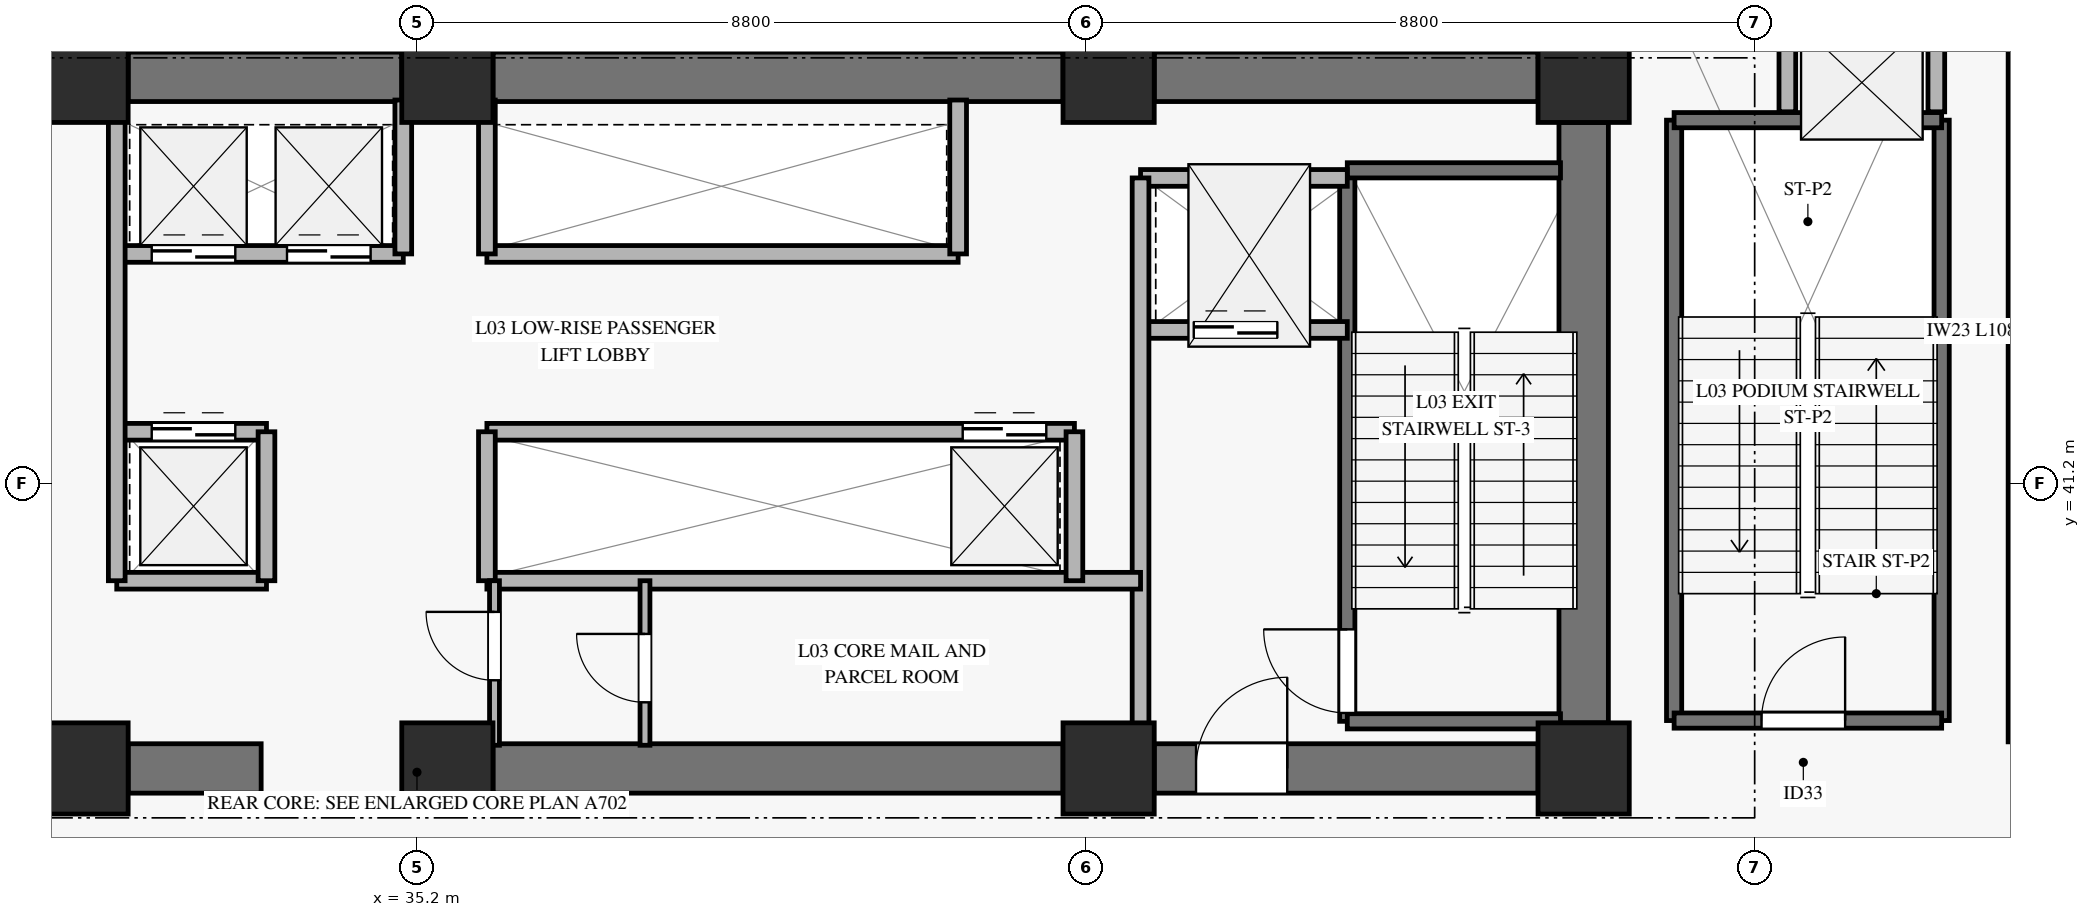
"""IFC4 building model, lengths in metres.
Left out: names, types, materials, properties, quantities, classifications, styles, units other than length and angle.
Written with IfcOpenShell. Run it as: python <this file> out.ifc"""

import sys

from ifc_helpers import new_model, si_unit, direction, frame, frame_2d, origin, origin_2d, place, context, subcontext, project, spatial, rectangle, extrude, source, transform, mapped, element, fill, save


model = new_model("IFC4")
c1 = context("Model", 3, precision=1e-05, world=origin(), true_north=direction((0.0, 1.0)))
c2 = subcontext(c1, "Body", "Model", "MODEL_VIEW")
j1 = project(units=[si_unit("LENGTHUNIT", "METRE"), si_unit("PLANEANGLEUNIT", "RADIAN")], contexts=[c1])
p1 = place(None, origin())
s1 = spatial("IfcSite", under=j1, at=p1, CompositionType="ELEMENT")
p2 = place(p1, origin())
s2 = spatial("IfcBuilding", under=s1, at=p2, CompositionType="ELEMENT")
p3 = place(p2, frame((0.0, 0.0, 10.4)))
s3 = spatial("IfcBuildingStorey", under=s2, at=p3, CompositionType="ELEMENT", Elevation=10.4)
m1 = source(origin(), c2, "Body", "SweptSolid", [
    extrude(rectangle(XDim=1.2, YDim=1.2, at=origin_2d()), origin(), (0.0, 0.0, 1.0), 4.54),
])
for number, where, z_axis, x_axis in (
    (1, (30.8, 37.45, 0.0), (0.0, 0.0, 1.0), (1.0, 0.0, 0.0)),
    (2, (30.8, 46.55, 0.0), (0.0, 0.0, 1.0), (1.0, 0.0, 0.0)),
    (3, (35.6, 37.45, 0.0), (0.0, 0.0, 1.0), (1.0, 0.0, 0.0)),
    (4, (35.6, 46.55, 0.0), (0.0, 0.0, 1.0), (1.0, 0.0, 0.0)),
    (5, (44.3, 37.45, 0.0), (0.0, 0.0, 1.0), (1.0, 0.0, 0.0)),
    (6, (44.3, 46.55, 0.0), (0.0, 0.0, 1.0), (1.0, 0.0, 0.0)),
    (7, (50.55, 37.45, 0.0), (0.0, 0.0, 1.0), (1.0, 0.0, 0.0)),
    (8, (50.55, 46.55, 0.0), (0.0, 0.0, 1.0), (1.0, 0.0, 0.0)),
):
    element("IfcColumn", number, at=place(p3, frame(where, z_axis=z_axis, x_axis=x_axis)), inside=s3, PredefinedType="PILASTER", context=c2, shape_type="MappedRepresentation", body=[
        mapped(m1, transform((0.0, 0.0, 0.0), x_axis=(1.0, 0.0, 0.0), y_axis=(0.0, 1.0, 0.0), z_axis=(0.0, 0.0, 1.0), scale=1.0)),
    ])
p4 = place(p3, frame((31.4, 46.55, 0.0), z_axis=(0.0, 0.0, 1.0), x_axis=(1.0, 0.0, 0.0)))
e9 = element("IfcWall", 9, at=p4, inside=s3, PredefinedType="SHEAR", context=c2, shape_type="SweptSolid", body=[
    extrude(rectangle(XDim=3.6, YDim=0.65, at=frame_2d((1.8, 0.0))), origin(), (0.0, 0.0, 1.0), 4.54),
])
p5 = place(p3, frame((36.2, 46.55, 0.0), z_axis=(0.0, 0.0, 1.0), x_axis=(1.0, 0.0, 0.0)))
e10 = element("IfcWall", 10, at=p5, inside=s3, PredefinedType="SHEAR", context=c2, shape_type="SweptSolid", body=[
    extrude(rectangle(XDim=7.5, YDim=0.65, at=frame_2d((3.75, 0.0))), origin(), (0.0, 0.0, 1.0), 4.54),
])
p6 = place(p3, frame((44.9, 46.55, 0.0), z_axis=(0.0, 0.0, 1.0), x_axis=(1.0, 0.0, 0.0)))
e11 = element("IfcWall", 11, at=p6, inside=s3, PredefinedType="SHEAR", context=c2, shape_type="SweptSolid", body=[
    extrude(rectangle(XDim=5.05, YDim=0.65, at=frame_2d((2.525, 0.0))), origin(), (0.0, 0.0, 1.0), 4.54),
])
p7 = place(p3, frame((31.4, 37.45, 0.0), z_axis=(0.0, 0.0, 1.0), x_axis=(1.0, 0.0, 0.0)))
e12 = element("IfcWall", 12, at=p7, inside=s3, PredefinedType="SHEAR", context=c2, shape_type="SweptSolid", body=[
    extrude(rectangle(XDim=1.75, YDim=0.65, at=frame_2d((0.875, 0.0))), origin(), (0.0, 0.0, 1.0), 4.54),
])
p8 = place(p3, frame((36.2, 37.45, 0.0), z_axis=(0.0, 0.0, 1.0), x_axis=(1.0, 0.0, 0.0)))
e13 = element("IfcWall", 13, at=p8, inside=s3, PredefinedType="SHEAR", context=c2, shape_type="SweptSolid", body=[
    extrude(rectangle(XDim=7.5, YDim=0.65, at=frame_2d((3.75, 0.0))), origin(), (0.0, 0.0, 1.0), 4.54),
])
p9 = place(p3, frame((44.9, 37.45, 0.0), z_axis=(0.0, 0.0, 1.0), x_axis=(1.0, 0.0, 0.0)))
e14 = element("IfcWall", 14, at=p9, inside=s3, PredefinedType="SHEAR", context=c2, shape_type="SweptSolid", body=[
    extrude(rectangle(XDim=5.05, YDim=0.65, at=frame_2d((2.525, 0.0))), origin(), (0.0, 0.0, 1.0), 4.54),
])
p10 = place(p9, frame((0.55, 0.0, 0.0)))
e15 = element("IfcOpeningElement", 15, at=p10, cuts=e14, PredefinedType="OPENING", context=c2, shape_type="SweptSolid", body=[
    extrude(rectangle(XDim=1.2, YDim=2.15, at=frame_2d((0.6, 1.075))), frame((0.0, 0.335, 0.0), z_axis=(0.0, -1.0, 0.0), x_axis=(1.0, 0.0, 0.0)), (0.0, 0.0, 1.0), 0.67),
])
p11 = place(p3, frame((50.55, 38.05, 0.0), z_axis=(0.0, 0.0, 1.0), x_axis=(0.0, 1.0, 0.0)))
e16 = element("IfcWall", 16, at=p11, inside=s3, PredefinedType="SHEAR", context=c2, shape_type="SweptSolid", body=[
    extrude(rectangle(XDim=7.9, YDim=0.65, at=frame_2d((3.95, 0.0))), origin(), (0.0, 0.0, 1.0), 4.54),
])
p12 = place(p3, frame((47.44, 38.07, 0.0), z_axis=(0.0, 0.0, 1.0), x_axis=(0.0, 1.0, 0.0)))
e17 = element("IfcWall", 17, at=p12, inside=s3, PredefinedType="SOLIDWALL", context=c2, shape_type="SweptSolid", body=[
    extrude(rectangle(XDim=7.25, YDim=0.2, at=frame_2d((3.625, 0.0))), origin(), (0.0, 0.0, 1.0), 4.8),
])
p13 = place(p12, frame((0.11, 0.0, 0.0)))
e18 = element("IfcOpeningElement", 18, at=p13, cuts=e17, PredefinedType="OPENING", context=c2, shape_type="SweptSolid", body=[
    extrude(rectangle(XDim=1.1, YDim=2.15, at=frame_2d((0.55, 1.075))), frame((0.0, 0.11, 0.0), z_axis=(0.0, -1.0, 0.0), x_axis=(1.0, 0.0, 0.0)), (0.0, 0.0, 1.0), 0.22),
])
for number, where, z_axis, x_axis in (
    (19, (47.44, 45.32, 0.0), (0.0, 0.0, 1.0), (1.0, 0.0, 0.0)),
    (20, (47.44, 38.07, 0.0), (0.0, 0.0, 1.0), (1.0, 0.0, 0.0)),
):
    element("IfcWall", number, at=place(p3, frame(where, z_axis=z_axis, x_axis=x_axis)), inside=s3, PredefinedType="SOLIDWALL", context=c2, shape_type="SweptSolid", body=[
        extrude(rectangle(XDim=2.805, YDim=0.2, at=frame_2d((1.403, 0.0))), origin(), (0.0, 0.0, 1.0), 4.8),
    ])
p14 = place(p3, frame((44.72, 43.22, 0.0), z_axis=(0.0, 0.0, 1.0), x_axis=(1.0, 0.0, 0.0)))
e21 = element("IfcWall", 21, at=p14, inside=s3, PredefinedType="SOLIDWALL", context=c2, shape_type="SweptSolid", body=[
    extrude(rectangle(XDim=2.72, YDim=0.22, at=frame_2d((1.36, 0.0))), origin(), (0.0, 0.0, 1.0), 4.54),
])
p15 = place(p14, frame((0.7, 0.0, 0.0)))
e22 = element("IfcOpeningElement", 22, at=p15, cuts=e21, PredefinedType="OPENING", context=c2, shape_type="SweptSolid", body=[
    extrude(rectangle(XDim=1.1, YDim=2.2, at=frame_2d((0.55, 1.1))), frame((0.0, 0.12, 0.0), z_axis=(0.0, -1.0, 0.0), x_axis=(1.0, 0.0, 0.0)), (0.0, 0.0, 1.0), 0.24),
])
p16 = place(p3, frame((44.72, 45.22, 0.0), z_axis=(0.0, 0.0, 1.0), x_axis=(1.0, 0.0, 0.0)))
e23 = element("IfcWall", 23, at=p16, inside=s3, PredefinedType="SOLIDWALL", context=c2, shape_type="SweptSolid", body=[
    extrude(rectangle(XDim=2.72, YDim=0.22, at=frame_2d((1.36, 0.0))), origin(), (0.0, 0.0, 1.0), 4.54),
])
p17 = place(p3, frame((44.72, 37.755, 0.0), z_axis=(0.0, 0.0, 1.0), x_axis=(0.0, 1.0, 0.0)))
e24 = element("IfcWall", 24, at=p17, inside=s3, PredefinedType="SOLIDWALL", context=c2, shape_type="SweptSolid", body=[
    extrude(rectangle(XDim=7.465, YDim=0.22, at=frame_2d((3.732, 0.0))), origin(), (0.0, 0.0, 1.0), 4.54),
])
for number, where, z_axis, x_axis in (
    (25, (51.74, 38.08, 0.0), (0.0, 0.0, 1.0), (0.0, 1.0, 0.0)),
    (26, (55.26, 38.08, 0.0), (0.0, 0.0, 1.0), (0.0, 1.0, 0.0)),
):
    element("IfcWall", number, at=place(p3, frame(where, z_axis=z_axis, x_axis=x_axis)), inside=s3, PredefinedType="SOLIDWALL", context=c2, shape_type="SweptSolid", body=[
        extrude(rectangle(XDim=7.9, YDim=0.2, at=frame_2d((3.95, 0.0))), origin(), (0.0, 0.0, 1.0), 4.8),
    ])
p18 = place(p3, frame((51.74, 45.98, 0.0), z_axis=(0.0, 0.0, 1.0), x_axis=(1.0, 0.0, 0.0)))
e27 = element("IfcWall", 27, at=p18, inside=s3, PredefinedType="SOLIDWALL", context=c2, shape_type="SweptSolid", body=[
    extrude(rectangle(XDim=3.52, YDim=0.2, at=frame_2d((1.76, 0.0))), origin(), (0.0, 0.0, 1.0), 4.8),
])
p19 = place(p3, frame((51.74, 38.08, 0.0), z_axis=(0.0, 0.0, 1.0), x_axis=(1.0, 0.0, 0.0)))
e28 = element("IfcWall", 28, at=p19, inside=s3, PredefinedType="SOLIDWALL", context=c2, shape_type="SweptSolid", body=[
    extrude(rectangle(XDim=3.52, YDim=0.2, at=frame_2d((1.76, 0.0))), origin(), (0.0, 0.0, 1.0), 4.8),
])
p20 = place(p19, frame((1.15, 0.0, 0.0)))
e29 = element("IfcOpeningElement", 29, at=p20, cuts=e28, PredefinedType="OPENING", context=c2, shape_type="SweptSolid", body=[
    extrude(rectangle(XDim=1.1, YDim=2.15, at=frame_2d((0.55, 1.075))), frame((0.0, 0.11, 0.0), z_axis=(0.0, -1.0, 0.0), x_axis=(1.0, 0.0, 0.0)), (0.0, 0.0, 1.0), 0.22),
])
for number, where, z_axis, x_axis in (
    (30, (53.23, 46.09, 0.0), (0.0, 0.0, 1.0), (0.0, 1.0, 0.0)),
    (31, (55.19, 46.09, 0.0), (0.0, 0.0, 1.0), (0.0, 1.0, 0.0)),
):
    element("IfcWall", number, at=place(p3, frame(where, z_axis=z_axis, x_axis=x_axis)), inside=s3, PredefinedType="SOLIDWALL", context=c2, shape_type="SweptSolid", body=[
        extrude(rectangle(XDim=1.29, YDim=0.22, at=frame_2d((0.645, 0.0))), origin(), (0.0, 0.0, 1.0), 4.54),
    ])
p21 = place(p3, frame((31.25, 44.22, 0.0), z_axis=(0.0, 0.0, 1.0), x_axis=(1.0, 0.0, 0.0)))
e32 = element("IfcWall", 32, at=p21, inside=s3, PredefinedType="SOLIDWALL", context=c2, shape_type="SweptSolid", body=[
    extrude(rectangle(XDim=3.77, YDim=0.22, at=frame_2d((1.885, 0.0))), origin(), (0.0, 0.0, 1.0), 4.54),
])
p22 = place(p21, frame((0.46, 0.0, 0.0)))
e33 = element("IfcOpeningElement", 33, at=p22, cuts=e32, PredefinedType="OPENING", context=c2, shape_type="SweptSolid", body=[
    extrude(rectangle(XDim=1.1, YDim=2.2, at=frame_2d((0.55, 1.1))), frame((0.0, 0.12, 0.0), z_axis=(0.0, -1.0, 0.0), x_axis=(1.0, 0.0, 0.0)), (0.0, 0.0, 1.0), 0.24),
])
p23 = place(p21, frame((2.24, 0.0, 0.0)))
e34 = element("IfcOpeningElement", 34, at=p23, cuts=e32, PredefinedType="OPENING", context=c2, shape_type="SweptSolid", body=[
    extrude(rectangle(XDim=1.1, YDim=2.2, at=frame_2d((0.55, 1.1))), frame((0.0, 0.12, 0.0), z_axis=(0.0, -1.0, 0.0), x_axis=(1.0, 0.0, 0.0)), (0.0, 0.0, 1.0), 0.24),
])
p24 = place(p3, frame((36.12, 44.22, 0.0), z_axis=(0.0, 0.0, 1.0), x_axis=(1.0, 0.0, 0.0)))
e35 = element("IfcWall", 35, at=p24, inside=s3, PredefinedType="SOLIDWALL", context=c2, shape_type="SweptSolid", body=[
    extrude(rectangle(XDim=6.2, YDim=0.22, at=frame_2d((3.1, 0.0))), origin(), (0.0, 0.0, 1.0), 4.54),
])
for number, where, z_axis, x_axis in (
    (36, (35.02, 44.22, 0.0), (0.0, 0.0, 1.0), (0.0, 1.0, 0.0)),
    (37, (36.12, 44.22, 0.0), (0.0, 0.0, 1.0), (0.0, 1.0, 0.0)),
    (38, (42.32, 44.22, 0.0), (0.0, 0.0, 1.0), (0.0, 1.0, 0.0)),
):
    element("IfcWall", number, at=place(p3, frame(where, z_axis=z_axis, x_axis=x_axis)), inside=s3, PredefinedType="SOLIDWALL", context=c2, shape_type="SweptSolid", body=[
        extrude(rectangle(XDim=2.025, YDim=0.22, at=frame_2d((1.013, 0.0))), origin(), (0.0, 0.0, 1.0), 4.54),
    ])
p25 = place(p3, frame((31.25, 41.88, 0.0), z_axis=(0.0, 0.0, 1.0), x_axis=(1.0, 0.0, 0.0)))
e39 = element("IfcWall", 39, at=p25, inside=s3, PredefinedType="SOLIDWALL", context=c2, shape_type="SweptSolid", body=[
    extrude(rectangle(XDim=1.97, YDim=0.22, at=frame_2d((0.985, 0.0))), origin(), (0.0, 0.0, 1.0), 4.54),
])
p26 = place(p25, frame((0.46, 0.0, 0.0)))
e40 = element("IfcOpeningElement", 40, at=p26, cuts=e39, PredefinedType="OPENING", context=c2, shape_type="SweptSolid", body=[
    extrude(rectangle(XDim=1.1, YDim=2.2, at=frame_2d((0.55, 1.1))), frame((0.0, 0.12, 0.0), z_axis=(0.0, -1.0, 0.0), x_axis=(1.0, 0.0, 0.0)), (0.0, 0.0, 1.0), 0.24),
])
p27 = place(p3, frame((36.12, 41.88, 0.0), z_axis=(0.0, 0.0, 1.0), x_axis=(1.0, 0.0, 0.0)))
e41 = element("IfcWall", 41, at=p27, inside=s3, PredefinedType="SOLIDWALL", context=c2, shape_type="SweptSolid", body=[
    extrude(rectangle(XDim=7.73, YDim=0.22, at=frame_2d((3.865, 0.0))), origin(), (0.0, 0.0, 1.0), 4.54),
])
p28 = place(p27, frame((6.26, 0.0, 0.0)))
e42 = element("IfcOpeningElement", 42, at=p28, cuts=e41, PredefinedType="OPENING", context=c2, shape_type="SweptSolid", body=[
    extrude(rectangle(XDim=1.1, YDim=2.2, at=frame_2d((0.55, 1.1))), frame((0.0, 0.12, 0.0), z_axis=(0.0, -1.0, 0.0), x_axis=(1.0, 0.0, 0.0)), (0.0, 0.0, 1.0), 0.24),
])
p29 = place(p3, frame((31.25, 39.92, 0.0), z_axis=(0.0, 0.0, 1.0), x_axis=(1.0, 0.0, 0.0)))
e43 = element("IfcWall", 43, at=p29, inside=s3, PredefinedType="SOLIDWALL", context=c2, shape_type="SweptSolid", body=[
    extrude(rectangle(XDim=1.97, YDim=0.22, at=frame_2d((0.985, 0.0))), origin(), (0.0, 0.0, 1.0), 4.54),
])
p30 = place(p3, frame((33.22, 39.92, 0.0), z_axis=(0.0, 0.0, 1.0), x_axis=(0.0, 1.0, 0.0)))
e44 = element("IfcWall", 44, at=p30, inside=s3, PredefinedType="SOLIDWALL", context=c2, shape_type="SweptSolid", body=[
    extrude(rectangle(XDim=1.96, YDim=0.22, at=frame_2d((0.98, 0.0))), origin(), (0.0, 0.0, 1.0), 4.54),
])
p31 = place(p3, frame((36.12, 39.92, 0.0), z_axis=(0.0, 0.0, 1.0), x_axis=(1.0, 0.0, 0.0)))
e45 = element("IfcWall", 45, at=p31, inside=s3, PredefinedType="SOLIDWALL", context=c2, shape_type="SweptSolid", body=[
    extrude(rectangle(XDim=8.6, YDim=0.22, at=frame_2d((4.3, 0.0))), origin(), (0.0, 0.0, 1.0), 3.825),
])
p32 = place(p3, frame((36.12, 39.92, 0.0), z_axis=(0.0, 0.0, 1.0), x_axis=(0.0, 1.0, 0.0)))
e46 = element("IfcWall", 46, at=p32, inside=s3, PredefinedType="SOLIDWALL", context=c2, shape_type="SweptSolid", body=[
    extrude(rectangle(XDim=1.96, YDim=0.22, at=frame_2d((0.98, 0.0))), origin(), (0.0, 0.0, 1.0), 4.54),
])
p33 = place(p3, frame((31.25, 39.92, 0.0), z_axis=(0.0, 0.0, 1.0), x_axis=(0.0, 1.0, 0.0)))
e47 = element("IfcWall", 47, at=p33, inside=s3, PredefinedType="SOLIDWALL", context=c2, shape_type="SweptSolid", body=[
    extrude(rectangle(XDim=6.325, YDim=0.22, at=frame_2d((3.163, 0.0))), origin(), (0.0, 0.0, 1.0), 4.54),
])
p34 = place(p3, frame((43.85, 39.92, 0.0), z_axis=(0.0, 0.0, 1.0), x_axis=(0.0, 1.0, 0.0)))
e48 = element("IfcWall", 48, at=p34, inside=s3, PredefinedType="SOLIDWALL", context=c2, shape_type="SweptSolid", body=[
    extrude(rectangle(XDim=1.96, YDim=0.22, at=frame_2d((0.98, 0.0))), origin(), (0.0, 0.0, 1.0), 4.54),
])
p35 = place(p3, frame((36.22, 37.755, 0.0), z_axis=(0.0, 0.0, 1.0), x_axis=(0.0, 1.0, 0.0)))
e49 = element("IfcWall", 49, at=p35, inside=s3, PredefinedType="PARTITIONING", context=c2, shape_type="SweptSolid", body=[
    extrude(rectangle(XDim=2.165, YDim=0.13, at=frame_2d((1.083, 0.0))), origin(), (0.0, 0.0, 1.0), 4.54),
])
p36 = place(p35, frame((0.855, 0.0, 0.0)))
e50 = element("IfcOpeningElement", 50, at=p36, cuts=e49, PredefinedType="OPENING", context=c2, shape_type="SweptSolid", body=[
    extrude(rectangle(XDim=0.9, YDim=2.1, at=frame_2d((0.45, 1.05))), frame((0.0, 0.075, 0.0), z_axis=(0.0, -1.0, 0.0), x_axis=(1.0, 0.0, 0.0)), (0.0, 0.0, 1.0), 0.15),
])
p37 = place(p3, frame((38.2, 37.755, 0.0), z_axis=(0.0, 0.0, 1.0), x_axis=(0.0, 1.0, 0.0)))
e51 = element("IfcWall", 51, at=p37, inside=s3, PredefinedType="PARTITIONING", context=c2, shape_type="SweptSolid", body=[
    extrude(rectangle(XDim=2.165, YDim=0.13, at=frame_2d((1.083, 0.0))), origin(), (0.0, 0.0, 1.0), 4.54),
])
p38 = place(p37, frame((0.565, 0.0, 0.0)))
e52 = element("IfcOpeningElement", 52, at=p38, cuts=e51, PredefinedType="OPENING", context=c2, shape_type="SweptSolid", body=[
    extrude(rectangle(XDim=0.9, YDim=2.1, at=frame_2d((0.45, 1.05))), frame((0.0, 0.075, 0.0), z_axis=(0.0, -1.0, 0.0), x_axis=(1.0, 0.0, 0.0)), (0.0, 0.0, 1.0), 0.15),
])
p39 = place(p3, frame((56.2, 37.8, 0.0), z_axis=(0.0, 0.0, 1.0), x_axis=(0.0, 1.0, 0.0)))
e53 = element("IfcWall", 53, at=p39, inside=s3, PredefinedType="PARTITIONING", context=c2, shape_type="SweptSolid", body=[
    extrude(rectangle(XDim=10.82, YDim=0.13, at=frame_2d((5.41, 0.0))), origin(), (0.0, 0.0, 1.0), 4.54),
])
m2 = source(origin(), c2, "Body", "SweptSolid", [
    extrude(rectangle(XDim=1.1, YDim=2.15, at=frame_2d((0.55, 1.075))), frame((0.0, 0.025, 0.0), z_axis=(0.0, -1.0, 0.0), x_axis=(1.0, 0.0, 0.0)), (0.0, 0.0, 1.0), 0.05),
])
p40 = place(p13, origin())
e54 = element("IfcDoor", 54, at=p40, inside=s3, OperationType="SINGLE_SWING_RIGHT", PredefinedType="DOOR", context=c2, shape_type="MappedRepresentation", body=[
    mapped(m2, transform((0.0, 0.0, 0.0), x_axis=(1.0, 0.0, 0.0), y_axis=(0.0, 1.0, 0.0), z_axis=(0.0, 0.0, 1.0), scale=1.0)),
])
fill(e18, e54)
m3 = source(origin(), c2, "Body", "SweptSolid", [
    extrude(rectangle(XDim=1.1, YDim=2.2, at=frame_2d((0.55, 1.1))), frame((0.0, 0.025, 0.0), z_axis=(0.0, -1.0, 0.0), x_axis=(1.0, 0.0, 0.0)), (0.0, 0.0, 1.0), 0.05),
])
p41 = place(p15, origin())
e55 = element("IfcDoor", 55, at=p41, inside=s3, OperationType="SLIDING_TO_LEFT", PredefinedType="DOOR", context=c2, shape_type="MappedRepresentation", body=[
    mapped(m3, transform((0.0, 0.0, 0.0), x_axis=(1.0, 0.0, 0.0), y_axis=(0.0, 1.0, 0.0), z_axis=(0.0, 0.0, 1.0), scale=1.0)),
])
fill(e22, e55)
m4 = source(origin(), c2, "Body", "SweptSolid", [
    extrude(rectangle(XDim=1.2, YDim=2.15, at=frame_2d((0.6, 1.075))), frame((0.0, 0.025, 0.0), z_axis=(0.0, -1.0, 0.0), x_axis=(1.0, 0.0, 0.0)), (0.0, 0.0, 1.0), 0.05),
])
p42 = place(p10, origin())
e56 = element("IfcDoor", 56, at=p42, inside=s3, OperationType="SINGLE_SWING_RIGHT", PredefinedType="DOOR", context=c2, shape_type="MappedRepresentation", body=[
    mapped(m4, transform((0.0, 0.0, 0.0), x_axis=(1.0, 0.0, 0.0), y_axis=(0.0, 1.0, 0.0), z_axis=(0.0, 0.0, 1.0), scale=1.0)),
])
fill(e15, e56)
p43 = place(p20, origin())
e57 = element("IfcDoor", 57, at=p43, inside=s3, OperationType="SINGLE_SWING_RIGHT", PredefinedType="DOOR", context=c2, shape_type="MappedRepresentation", body=[
    mapped(m2, transform((0.0, 0.0, 0.0), x_axis=(1.0, 0.0, 0.0), y_axis=(0.0, 1.0, 0.0), z_axis=(0.0, 0.0, 1.0), scale=1.0)),
])
fill(e29, e57)
p44 = place(p22, origin())
e58 = element("IfcDoor", 58, at=p44, inside=s3, OperationType="SLIDING_TO_LEFT", PredefinedType="DOOR", context=c2, shape_type="MappedRepresentation", body=[
    mapped(m3, transform((0.0, 0.0, 0.0), x_axis=(1.0, 0.0, 0.0), y_axis=(0.0, 1.0, 0.0), z_axis=(0.0, 0.0, 1.0), scale=1.0)),
])
fill(e33, e58)
p45 = place(p23, origin())
e59 = element("IfcDoor", 59, at=p45, inside=s3, OperationType="SLIDING_TO_LEFT", PredefinedType="DOOR", context=c2, shape_type="MappedRepresentation", body=[
    mapped(m3, transform((0.0, 0.0, 0.0), x_axis=(1.0, 0.0, 0.0), y_axis=(0.0, 1.0, 0.0), z_axis=(0.0, 0.0, 1.0), scale=1.0)),
])
fill(e34, e59)
p46 = place(p26, origin())
e60 = element("IfcDoor", 60, at=p46, inside=s3, OperationType="SLIDING_TO_LEFT", PredefinedType="DOOR", context=c2, shape_type="MappedRepresentation", body=[
    mapped(m3, transform((0.0, 0.0, 0.0), x_axis=(1.0, 0.0, 0.0), y_axis=(0.0, 1.0, 0.0), z_axis=(0.0, 0.0, 1.0), scale=1.0)),
])
fill(e40, e60)
p47 = place(p28, origin())
e61 = element("IfcDoor", 61, at=p47, inside=s3, OperationType="SLIDING_TO_LEFT", PredefinedType="DOOR", context=c2, shape_type="MappedRepresentation", body=[
    mapped(m3, transform((0.0, 0.0, 0.0), x_axis=(1.0, 0.0, 0.0), y_axis=(0.0, 1.0, 0.0), z_axis=(0.0, 0.0, 1.0), scale=1.0)),
])
fill(e42, e61)
m5 = source(origin(), c2, "Body", "SweptSolid", [
    extrude(rectangle(XDim=0.9, YDim=2.1, at=frame_2d((0.45, 1.05))), frame((0.0, 0.025, 0.0), z_axis=(0.0, -1.0, 0.0), x_axis=(1.0, 0.0, 0.0)), (0.0, 0.0, 1.0), 0.05),
])
p48 = place(p36, origin())
e62 = element("IfcDoor", 62, at=p48, inside=s3, OperationType="SINGLE_SWING_RIGHT", PredefinedType="DOOR", context=c2, shape_type="MappedRepresentation", body=[
    mapped(m5, transform((0.0, 0.0, 0.0), x_axis=(1.0, 0.0, 0.0), y_axis=(0.0, 1.0, 0.0), z_axis=(0.0, 0.0, 1.0), scale=1.0)),
])
fill(e50, e62)
p49 = place(p38, origin())
e63 = element("IfcDoor", 63, at=p49, inside=s3, OperationType="SINGLE_SWING_RIGHT", PredefinedType="DOOR", context=c2, shape_type="MappedRepresentation", body=[
    mapped(m5, transform((0.0, 0.0, 0.0), x_axis=(1.0, 0.0, 0.0), y_axis=(0.0, 1.0, 0.0), z_axis=(0.0, 0.0, 1.0), scale=1.0)),
])
fill(e52, e63)
save(model, sys.argv[1])
